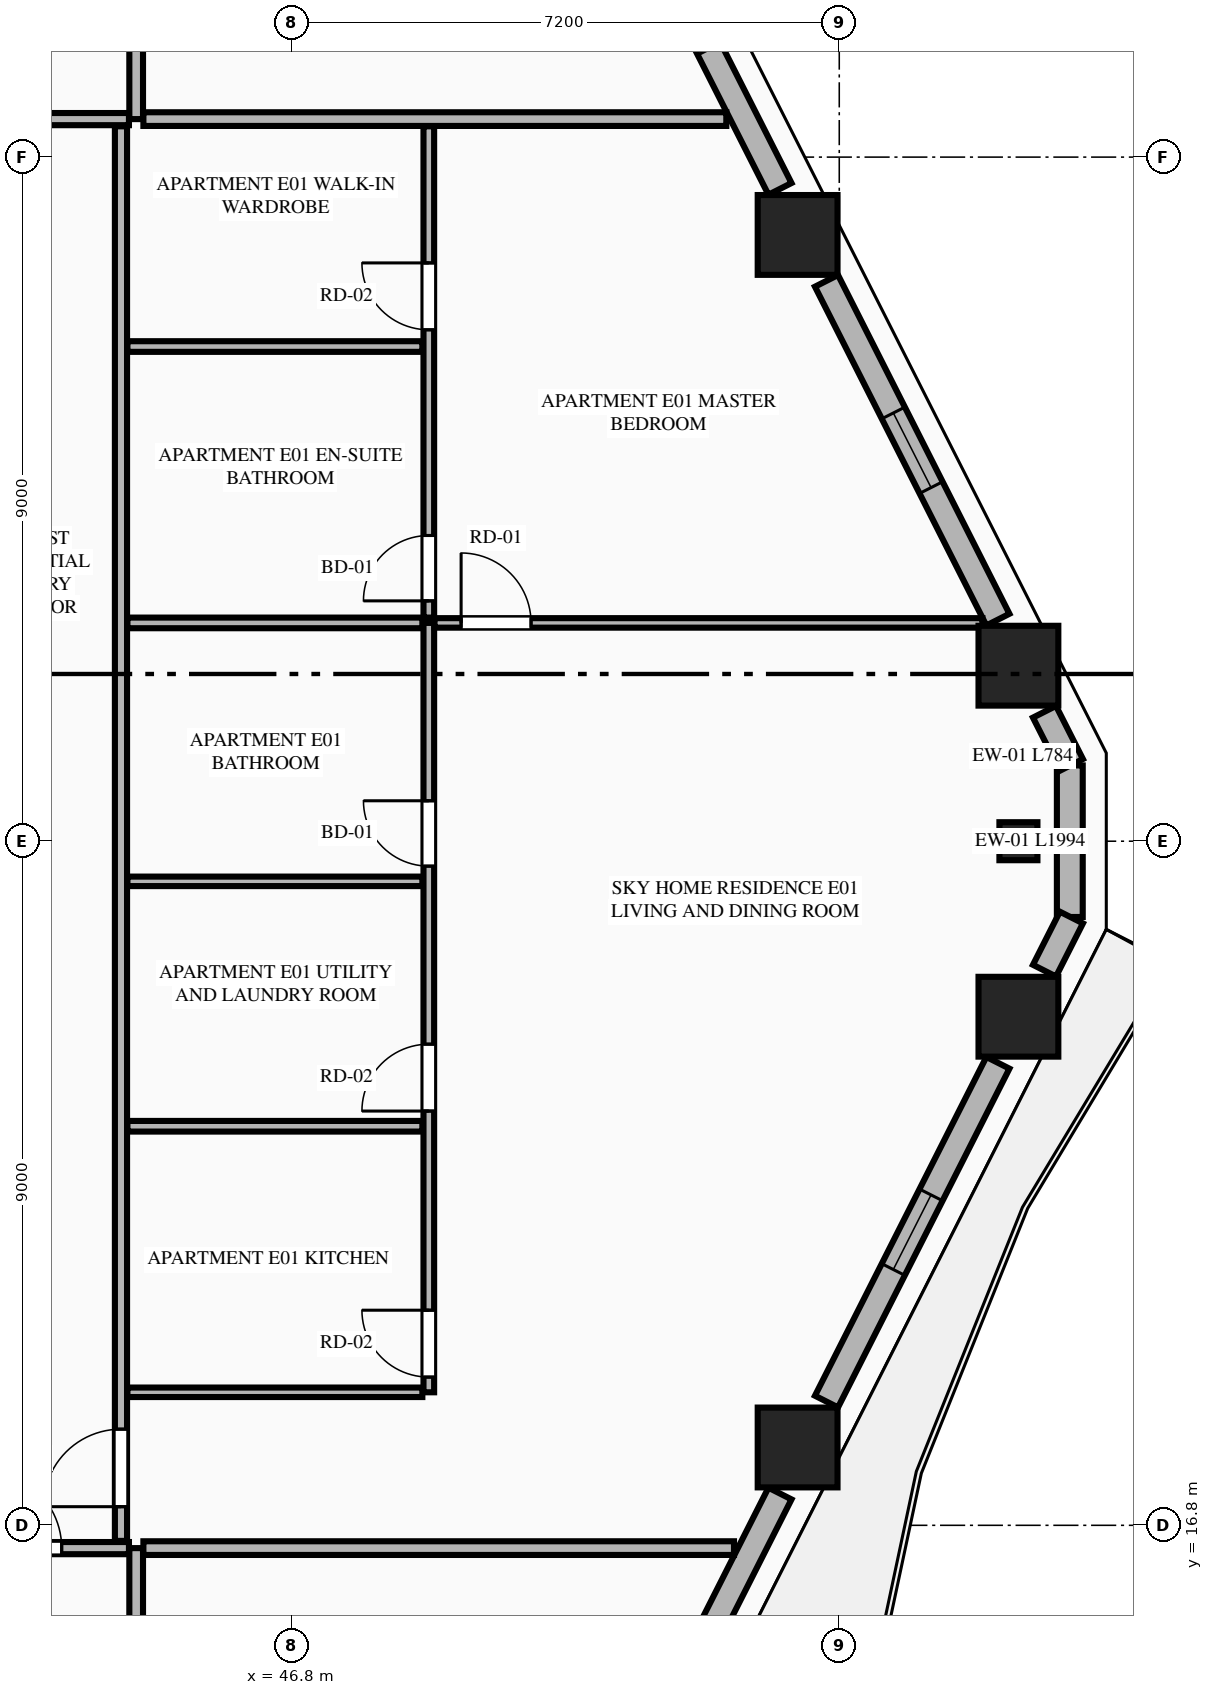
"""IFC4 building model, lengths in metres.
Left out: names, types, materials, properties, quantities, classifications, styles, units other than length and angle.
Written with IfcOpenShell. Run it as: python <this file> out.ifc"""

import sys

from ifc_helpers import new_model, si_unit, direction, frame, frame_2d, origin, origin_2d, place, context, subcontext, project, spatial, rectangle, extrude, element, fill, save


model = new_model("IFC4")
c1 = context("Model", 3, precision=1e-05, world=origin(), true_north=direction((0.0, 1.0)))
c2 = subcontext(c1, "Body", "Model", "MODEL_VIEW")
j1 = project(units=[si_unit("LENGTHUNIT", "METRE"), si_unit("PLANEANGLEUNIT", "RADIAN")], contexts=[c1])
p1 = place(None, origin())
s1 = spatial("IfcSite", under=j1, at=p1, CompositionType="ELEMENT")
p2 = place(p1, origin())
s2 = spatial("IfcBuilding", under=s1, at=p2, CompositionType="ELEMENT")
p3 = place(p2, frame((0.0, 0.0, 116.15)))
s3 = spatial("IfcBuildingStorey", under=s2, at=p3, CompositionType="ELEMENT", Elevation=116.15)
for number, where, z_axis, x_axis in (
    (1, (53.452, 17.824, 0.0), (0.0, 0.0, 1.0), (1.0, 0.0, 0.0)),
    (2, (56.357, 23.491, 0.0), (0.0, 0.0, 1.0), (1.0, 0.0, 0.0)),
    (3, (56.357, 28.109, 0.0), (0.0, 0.0, 1.0), (1.0, 0.0, 0.0)),
    (4, (53.452, 33.776, 0.0), (0.0, 0.0, 1.0), (1.0, 0.0, 0.0)),
):
    element("IfcColumn", number, at=place(p3, frame(where, z_axis=z_axis, x_axis=x_axis)), inside=s3, PredefinedType="COLUMN", context=c2, shape_type="SweptSolid", body=[
        extrude(rectangle(XDim=1.05, YDim=1.05, at=origin_2d()), origin(), (0.0, 0.0, 1.0), 3.55),
    ])
p4 = place(p3, frame((56.357, 25.8, 0.0), z_axis=(0.0, 0.0, 1.0), x_axis=(0.0, 1.0, 0.0)))
e5 = element("IfcColumn", 5, at=p4, inside=s3, PredefinedType="PILASTER", context=c2, shape_type="SweptSolid", body=[
    extrude(rectangle(XDim=0.5, YDim=0.35, at=origin_2d()), origin(), (0.0, 0.0, 1.0), 3.55),
])
p5 = place(p3, frame((57.033, 24.803, 0.0), z_axis=(0.0, 0.0, 1.0), x_axis=(0.0, 1.0, 0.0)))
e6 = element("IfcWall", 6, at=p5, inside=s3, PredefinedType="STANDARD", context=c2, shape_type="SweptSolid", body=[
    extrude(rectangle(XDim=1.994, YDim=0.34, at=frame_2d((0.997, 0.0))), origin(), (0.0, 0.0, 1.0), 3.34),
])
p6 = place(p3, frame((50.863, 12.561, 0.0), z_axis=(0.0, 0.0, 1.0), x_axis=(0.451567731634, 0.892236842855, 0.0)))
e7 = element("IfcWall", 7, at=p6, inside=s3, PredefinedType="STANDARD", context=c2, shape_type="SweptSolid", body=[
    extrude(rectangle(XDim=5.219, YDim=0.34, at=frame_2d((2.61, 0.0))), origin(), (0.0, 0.0, 1.0), 2.797),
])
p7 = place(p6, frame((1.532, 0.0, 0.0)))
e8 = element("IfcOpeningElement", 8, at=p7, cuts=e7, PredefinedType="OPENING", context=c2, shape_type="SweptSolid", body=[
    extrude(rectangle(XDim=1.1, YDim=2.25, at=frame_2d((0.55, 1.125))), frame((0.0, 0.18, 0.0), z_axis=(0.0, -1.0, 0.0), x_axis=(1.0, 0.0, 0.0)), (0.0, 0.0, 1.0), 0.36),
])
p8 = place(p3, frame((53.832, 18.428, 0.0), z_axis=(0.0, 0.0, 1.0), x_axis=(0.451431617681, 0.892305718102, 0.0)))
e9 = element("IfcWall", 9, at=p8, inside=s3, PredefinedType="STANDARD", context=c2, shape_type="SweptSolid", body=[
    extrude(rectangle(XDim=4.995, YDim=0.34, at=frame_2d((2.498, 0.0))), origin(), (0.0, 0.0, 1.0), 2.797),
])
p9 = place(p8, frame((1.947, 0.0, 0.75)))
e10 = element("IfcOpeningElement", 10, at=p9, cuts=e9, PredefinedType="OPENING", context=c2, shape_type="SweptSolid", body=[
    extrude(rectangle(XDim=1.1, YDim=1.897, at=frame_2d((0.55, 0.948))), frame((0.0, 0.18, 0.0), z_axis=(0.0, -1.0, 0.0), x_axis=(1.0, 0.0, 0.0)), (0.0, 0.0, 1.0), 0.36),
])
for number, where, z_axis, x_axis in (
    (11, (56.7, 24.097, 0.0), (0.0, 0.0, 1.0), (0.452, 0.892, 0.0)),
    (12, (57.054, 26.804, 0.0), (0.0, 0.0, 1.0), (-0.452, 0.892, 0.0)),
):
    element("IfcWall", number, at=place(p3, frame(where, z_axis=z_axis, x_axis=x_axis)), inside=s3, PredefinedType="STANDARD", context=c2, shape_type="SweptSolid", body=[
        extrude(rectangle(XDim=0.783, YDim=0.34, at=frame_2d((0.392, 0.0))), origin(), (0.0, 0.0, 1.0), 3.34),
    ])
p10 = place(p3, frame((56.087, 28.715, 0.0), z_axis=(0.0, 0.0, 1.0), x_axis=(-0.451431617681, 0.892305718102, 0.0)))
e13 = element("IfcWall", 13, at=p10, inside=s3, PredefinedType="STANDARD", context=c2, shape_type="SweptSolid", body=[
    extrude(rectangle(XDim=4.995, YDim=0.34, at=frame_2d((2.498, 0.0))), origin(), (0.0, 0.0, 1.0), 2.797),
])
p11 = place(p10, frame((1.947, 0.0, 0.75)))
e14 = element("IfcOpeningElement", 14, at=p11, cuts=e13, PredefinedType="OPENING", context=c2, shape_type="SweptSolid", body=[
    extrude(rectangle(XDim=1.1, YDim=1.897, at=frame_2d((0.55, 0.948))), frame((0.0, 0.18, 0.0), z_axis=(0.0, -1.0, 0.0), x_axis=(1.0, 0.0, 0.0)), (0.0, 0.0, 1.0), 0.36),
])
p12 = place(p3, frame((53.22, 34.382, 0.0), z_axis=(0.0, 0.0, 1.0), x_axis=(-0.451567731634, 0.892236842855, 0.0)))
e15 = element("IfcWall", 15, at=p12, inside=s3, PredefinedType="STANDARD", context=c2, shape_type="SweptSolid", body=[
    extrude(rectangle(XDim=5.219, YDim=0.34, at=frame_2d((2.61, 0.0))), origin(), (0.0, 0.0, 1.0), 2.797),
])
p13 = place(p12, frame((2.06, 0.0, 0.75)))
e16 = element("IfcOpeningElement", 16, at=p13, cuts=e15, PredefinedType="OPENING", context=c2, shape_type="SweptSolid", body=[
    extrude(rectangle(XDim=1.1, YDim=1.897, at=frame_2d((0.55, 0.948))), frame((0.0, 0.18, 0.0), z_axis=(0.0, -1.0, 0.0), x_axis=(1.0, 0.0, 0.0)), (0.0, 0.0, 1.0), 0.36),
])
p14 = place(p3, frame((44.75, 4.105, 0.0), z_axis=(0.0, 0.0, 1.0), x_axis=(0.0, 1.0, 0.0)))
e17 = element("IfcWall", 17, at=p14, inside=s3, PredefinedType="PARTITIONING", context=c2, shape_type="SweptSolid", body=[
    extrude(rectangle(XDim=12.395, YDim=0.18, at=frame_2d((6.198, 0.0))), origin(), (0.0, 0.0, 1.0), 3.34),
])
p15 = place(p3, frame((28.663, 16.5, 0.0), z_axis=(0.0, 0.0, 1.0), x_axis=(1.0, 0.0, 0.0)))
e18 = element("IfcWall", 18, at=p15, inside=s3, PredefinedType="PARTITIONING", context=c2, shape_type="SweptSolid", body=[
    extrude(rectangle(XDim=15.992, YDim=0.16, at=frame_2d((7.996, 0.0))), origin(), (0.0, 0.0, 1.0), 3.34),
])
p16 = place(p15, frame((14.087, 0.0, 0.0)))
e19 = element("IfcOpeningElement", 19, at=p16, cuts=e18, PredefinedType="OPENING", context=c2, shape_type="SweptSolid", body=[
    extrude(rectangle(XDim=1.02, YDim=2.25, at=frame_2d((0.51, 1.125))), frame((0.0, 0.09, 0.0), z_axis=(0.0, -1.0, 0.0), x_axis=(1.0, 0.0, 0.0)), (0.0, 0.0, 1.0), 0.18),
])
p17 = place(p3, frame((44.75, 35.3, 0.0), z_axis=(0.0, 0.0, 1.0), x_axis=(0.0, 1.0, 0.0)))
e20 = element("IfcWall", 20, at=p17, inside=s3, PredefinedType="PARTITIONING", context=c2, shape_type="SweptSolid", body=[
    extrude(rectangle(XDim=12.195, YDim=0.18, at=frame_2d((6.098, 0.0))), origin(), (0.0, 0.0, 1.0), 3.34),
])
p18 = place(p3, frame((20.145, 35.3, 0.0), z_axis=(0.0, 0.0, 1.0), x_axis=(1.0, 0.0, 0.0)))
e21 = element("IfcWall", 21, at=p18, inside=s3, PredefinedType="PARTITIONING", context=c2, shape_type="SweptSolid", body=[
    extrude(rectangle(XDim=24.51, YDim=0.16, at=frame_2d((12.255, 0.0))), origin(), (0.0, 0.0, 1.0), 3.34),
])
p19 = place(p18, frame((0.405, 0.0, 0.0)))
e22 = element("IfcOpeningElement", 22, at=p19, cuts=e21, PredefinedType="OPENING", context=c2, shape_type="SweptSolid", body=[
    extrude(rectangle(XDim=1.35, YDim=2.35, at=frame_2d((0.675, 1.175))), frame((0.0, 0.09, 0.0), z_axis=(0.0, -1.0, 0.0), x_axis=(1.0, 0.0, 0.0)), (0.0, 0.0, 1.0), 0.18),
])
p20 = place(p3, frame((44.845, 16.5, 0.0), z_axis=(0.0, 0.0, 1.0), x_axis=(1.0, 0.0, 0.0)))
e23 = element("IfcWall", 23, at=p20, inside=s3, PredefinedType="PARTITIONING", context=c2, shape_type="SweptSolid", body=[
    extrude(rectangle(XDim=7.77, YDim=0.18, at=frame_2d((3.885, 0.0))), origin(), (0.0, 0.0, 1.0), 3.34),
])
p21 = place(p3, frame((44.845, 35.3, 0.0), z_axis=(0.0, 0.0, 1.0), x_axis=(1.0, 0.0, 0.0)))
e24 = element("IfcWall", 24, at=p21, inside=s3, PredefinedType="PARTITIONING", context=c2, shape_type="SweptSolid", body=[
    extrude(rectangle(XDim=7.669, YDim=0.18, at=frame_2d((3.834, 0.0))), origin(), (0.0, 0.0, 1.0), 3.34),
])
p22 = place(p3, frame((44.55, 16.595, 0.0), z_axis=(0.0, 0.0, 1.0), x_axis=(0.0, 1.0, 0.0)))
e25 = element("IfcWall", 25, at=p22, inside=s3, PredefinedType="PARTITIONING", context=c2, shape_type="SweptSolid", body=[
    extrude(rectangle(XDim=18.61, YDim=0.16, at=frame_2d((9.305, 0.0))), origin(), (0.0, 0.0, 1.0), 3.34),
])
p23 = place(p22, frame((0.45, 0.0, 0.0)))
e26 = element("IfcOpeningElement", 26, at=p23, cuts=e25, PredefinedType="OPENING", context=c2, shape_type="SweptSolid", body=[
    extrude(rectangle(XDim=1.02, YDim=2.25, at=frame_2d((0.51, 1.125))), frame((0.0, 0.09, 0.0), z_axis=(0.0, -1.0, 0.0), x_axis=(1.0, 0.0, 0.0)), (0.0, 0.0, 1.0), 0.18),
])
p24 = place(p3, frame((44.635, 18.55, 0.0), z_axis=(0.0, 0.0, 1.0), x_axis=(1.0, 0.0, 0.0)))
e27 = element("IfcWall", 27, at=p24, inside=s3, PredefinedType="PARTITIONING", context=c2, shape_type="SweptSolid", body=[
    extrude(rectangle(XDim=3.88, YDim=0.125, at=frame_2d((1.94, 0.0))), origin(), (0.0, 0.0, 1.0), 2.722),
])
p25 = place(p3, frame((48.6, 18.55, 0.0), z_axis=(0.0, 0.0, 1.0), x_axis=(0.0, 1.0, 0.0)))
e28 = element("IfcWall", 28, at=p25, inside=s3, PredefinedType="PLUMBINGWALL", context=c2, shape_type="SweptSolid", body=[
    extrude(rectangle(XDim=10.122, YDim=0.14, at=frame_2d((5.061, 0.0))), origin(), (0.0, 0.0, 1.0), 3.34),
])
p26 = place(p25, frame((0.2, 0.0, 0.0)))
e29 = element("IfcOpeningElement", 29, at=p26, cuts=e28, PredefinedType="OPENING", context=c2, shape_type="SweptSolid", body=[
    extrude(rectangle(XDim=0.88, YDim=2.15, at=frame_2d((0.44, 1.075))), frame((0.0, 0.08, 0.0), z_axis=(0.0, -1.0, 0.0), x_axis=(1.0, 0.0, 0.0)), (0.0, 0.0, 1.0), 0.16),
])
p27 = place(p25, frame((3.7, 0.0, 0.0)))
e30 = element("IfcOpeningElement", 30, at=p27, cuts=e28, PredefinedType="OPENING", context=c2, shape_type="SweptSolid", body=[
    extrude(rectangle(XDim=0.88, YDim=2.15, at=frame_2d((0.44, 1.075))), frame((0.0, 0.08, 0.0), z_axis=(0.0, -1.0, 0.0), x_axis=(1.0, 0.0, 0.0)), (0.0, 0.0, 1.0), 0.16),
])
p28 = place(p25, frame((6.922, 0.0, 0.0)))
e31 = element("IfcOpeningElement", 31, at=p28, cuts=e28, PredefinedType="OPENING", context=c2, shape_type="SweptSolid", body=[
    extrude(rectangle(XDim=0.86, YDim=2.1, at=frame_2d((0.43, 1.05))), frame((0.0, 0.08, 0.0), z_axis=(0.0, -1.0, 0.0), x_axis=(1.0, 0.0, 0.0)), (0.0, 0.0, 1.0), 0.16),
])
p29 = place(p3, frame((48.6, 28.742, 0.0), z_axis=(0.0, 0.0, 1.0), x_axis=(0.0, 1.0, 0.0)))
e32 = element("IfcWall", 32, at=p29, inside=s3, PredefinedType="PLUMBINGWALL", context=c2, shape_type="SweptSolid", body=[
    extrude(rectangle(XDim=6.463, YDim=0.14, at=frame_2d((3.231, 0.0))), origin(), (0.0, 0.0, 1.0), 3.34),
])
p30 = place(p29, frame((0.22, 0.0, 0.0)))
e33 = element("IfcOpeningElement", 33, at=p30, cuts=e32, PredefinedType="OPENING", context=c2, shape_type="SweptSolid", body=[
    extrude(rectangle(XDim=0.86, YDim=2.1, at=frame_2d((0.43, 1.05))), frame((0.0, 0.08, 0.0), z_axis=(0.0, -1.0, 0.0), x_axis=(1.0, 0.0, 0.0)), (0.0, 0.0, 1.0), 0.16),
])
p31 = place(p29, frame((3.786, 0.0, 0.0)))
e34 = element("IfcOpeningElement", 34, at=p31, cuts=e32, PredefinedType="OPENING", context=c2, shape_type="SweptSolid", body=[
    extrude(rectangle(XDim=0.88, YDim=2.15, at=frame_2d((0.44, 1.075))), frame((0.0, 0.08, 0.0), z_axis=(0.0, -1.0, 0.0), x_axis=(1.0, 0.0, 0.0)), (0.0, 0.0, 1.0), 0.16),
])
p32 = place(p3, frame((44.635, 28.672, 0.0), z_axis=(0.0, 0.0, 1.0), x_axis=(1.0, 0.0, 0.0)))
e35 = element("IfcWall", 35, at=p32, inside=s3, PredefinedType="PLUMBINGWALL", context=c2, shape_type="SweptSolid", body=[
    extrude(rectangle(XDim=3.88, YDim=0.14, at=frame_2d((1.94, 0.0))), origin(), (0.0, 0.0, 1.0), 3.34),
])
p33 = place(p3, frame((48.675, 28.672, 0.0), z_axis=(0.0, 0.0, 1.0), x_axis=(1.0, 0.0, 0.0)))
e36 = element("IfcWall", 36, at=p33, inside=s3, PredefinedType="PARTITIONING", context=c2, shape_type="SweptSolid", body=[
    extrude(rectangle(XDim=7.208, YDim=0.125, at=frame_2d((3.604, 0.0))), origin(), (0.0, 0.0, 1.0), 3.34),
])
p34 = place(p33, frame((0.35, 0.0, 0.0)))
e37 = element("IfcOpeningElement", 37, at=p34, cuts=e36, PredefinedType="OPENING", context=c2, shape_type="SweptSolid", body=[
    extrude(rectangle(XDim=0.92, YDim=2.15, at=frame_2d((0.46, 1.075))), frame((0.0, 0.073, 0.0), z_axis=(0.0, -1.0, 0.0), x_axis=(1.0, 0.0, 0.0)), (0.0, 0.0, 1.0), 0.145),
])
p35 = place(p3, frame((44.635, 22.05, 0.0), z_axis=(0.0, 0.0, 1.0), x_axis=(1.0, 0.0, 0.0)))
e38 = element("IfcWall", 38, at=p35, inside=s3, PredefinedType="PLUMBINGWALL", context=c2, shape_type="SweptSolid", body=[
    extrude(rectangle(XDim=3.88, YDim=0.14, at=frame_2d((1.94, 0.0))), origin(), (0.0, 0.0, 1.0), 3.34),
])
p36 = place(p3, frame((44.635, 25.272, 0.0), z_axis=(0.0, 0.0, 1.0), x_axis=(1.0, 0.0, 0.0)))
e39 = element("IfcWall", 39, at=p36, inside=s3, PredefinedType="PARTITIONING", context=c2, shape_type="SweptSolid", body=[
    extrude(rectangle(XDim=3.88, YDim=0.125, at=frame_2d((1.94, 0.0))), origin(), (0.0, 0.0, 1.0), 3.34),
])
p37 = place(p3, frame((44.635, 32.308, 0.0), z_axis=(0.0, 0.0, 1.0), x_axis=(1.0, 0.0, 0.0)))
e40 = element("IfcWall", 40, at=p37, inside=s3, PredefinedType="PLUMBINGWALL", context=c2, shape_type="SweptSolid", body=[
    extrude(rectangle(XDim=3.88, YDim=0.14, at=frame_2d((1.94, 0.0))), origin(), (0.0, 0.0, 1.0), 3.34),
])
p38 = place(p9, origin())
e41 = element("IfcWindow", 41, at=p38, inside=s3, PartitioningType="SINGLE_PANEL", PredefinedType="WINDOW", context=c2, shape_type="SweptSolid", body=[
    extrude(rectangle(XDim=1.1, YDim=1.897, at=frame_2d((0.55, 0.948))), frame((0.0, 0.03, 0.0), z_axis=(0.0, -1.0, 0.0), x_axis=(1.0, 0.0, 0.0)), (0.0, 0.0, 1.0), 0.06),
])
fill(e10, e41)
p39 = place(p11, origin())
e42 = element("IfcWindow", 42, at=p39, inside=s3, PartitioningType="SINGLE_PANEL", PredefinedType="WINDOW", context=c2, shape_type="SweptSolid", body=[
    extrude(rectangle(XDim=1.1, YDim=1.897, at=frame_2d((0.55, 0.948))), frame((0.0, 0.03, 0.0), z_axis=(0.0, -1.0, 0.0), x_axis=(1.0, 0.0, 0.0)), (0.0, 0.0, 1.0), 0.06),
])
fill(e14, e42)
p40 = place(p16, origin())
e43 = element("IfcDoor", 43, at=p40, inside=s3, OperationType="SINGLE_SWING_LEFT", PredefinedType="DOOR", context=c2, shape_type="SweptSolid", body=[
    extrude(rectangle(XDim=1.02, YDim=2.25, at=frame_2d((0.51, 1.125))), frame((0.0, 0.025, 0.0), z_axis=(0.0, -1.0, 0.0), x_axis=(1.0, 0.0, 0.0)), (0.0, 0.0, 1.0), 0.05),
])
fill(e19, e43)
p41 = place(p26, origin())
e44 = element("IfcDoor", 44, at=p41, inside=s3, OperationType="SINGLE_SWING_RIGHT", PredefinedType="DOOR", context=c2, shape_type="SweptSolid", body=[
    extrude(rectangle(XDim=0.88, YDim=2.15, at=frame_2d((0.44, 1.075))), frame((0.0, 0.025, 0.0), z_axis=(0.0, -1.0, 0.0), x_axis=(1.0, 0.0, 0.0)), (0.0, 0.0, 1.0), 0.05),
])
fill(e29, e44)
p42 = place(p27, origin())
e45 = element("IfcDoor", 45, at=p42, inside=s3, OperationType="SINGLE_SWING_LEFT", PredefinedType="DOOR", context=c2, shape_type="SweptSolid", body=[
    extrude(rectangle(XDim=0.88, YDim=2.15, at=frame_2d((0.44, 1.075))), frame((0.0, 0.025, 0.0), z_axis=(0.0, -1.0, 0.0), x_axis=(1.0, 0.0, 0.0)), (0.0, 0.0, 1.0), 0.05),
])
fill(e30, e45)
p43 = place(p28, origin())
e46 = element("IfcDoor", 46, at=p43, inside=s3, OperationType="SINGLE_SWING_RIGHT", PredefinedType="DOOR", context=c2, shape_type="SweptSolid", body=[
    extrude(rectangle(XDim=0.86, YDim=2.1, at=frame_2d((0.43, 1.05))), frame((0.0, 0.025, 0.0), z_axis=(0.0, -1.0, 0.0), x_axis=(1.0, 0.0, 0.0)), (0.0, 0.0, 1.0), 0.05),
])
fill(e31, e46)
p44 = place(p30, origin())
e47 = element("IfcDoor", 47, at=p44, inside=s3, OperationType="SINGLE_SWING_LEFT", PredefinedType="DOOR", context=c2, shape_type="SweptSolid", body=[
    extrude(rectangle(XDim=0.86, YDim=2.1, at=frame_2d((0.43, 1.05))), frame((0.0, 0.025, 0.0), z_axis=(0.0, -1.0, 0.0), x_axis=(1.0, 0.0, 0.0)), (0.0, 0.0, 1.0), 0.05),
])
fill(e33, e47)
p45 = place(p31, origin())
e48 = element("IfcDoor", 48, at=p45, inside=s3, OperationType="SINGLE_SWING_RIGHT", PredefinedType="DOOR", context=c2, shape_type="SweptSolid", body=[
    extrude(rectangle(XDim=0.88, YDim=2.15, at=frame_2d((0.44, 1.075))), frame((0.0, 0.025, 0.0), z_axis=(0.0, -1.0, 0.0), x_axis=(1.0, 0.0, 0.0)), (0.0, 0.0, 1.0), 0.05),
])
fill(e34, e48)
p46 = place(p23, origin())
e49 = element("IfcDoor", 49, at=p46, inside=s3, OperationType="SINGLE_SWING_LEFT", PredefinedType="DOOR", context=c2, shape_type="SweptSolid", body=[
    extrude(rectangle(XDim=1.02, YDim=2.25, at=frame_2d((0.51, 1.125))), frame((0.0, 0.025, 0.0), z_axis=(0.0, -1.0, 0.0), x_axis=(1.0, 0.0, 0.0)), (0.0, 0.0, 1.0), 0.05),
])
fill(e26, e49)
p47 = place(p34, origin())
e50 = element("IfcDoor", 50, at=p47, inside=s3, OperationType="SINGLE_SWING_LEFT", PredefinedType="DOOR", context=c2, shape_type="SweptSolid", body=[
    extrude(rectangle(XDim=0.92, YDim=2.15, at=frame_2d((0.46, 1.075))), frame((0.0, 0.025, 0.0), z_axis=(0.0, -1.0, 0.0), x_axis=(1.0, 0.0, 0.0)), (0.0, 0.0, 1.0), 0.05),
])
fill(e37, e50)
save(model, sys.argv[1])
